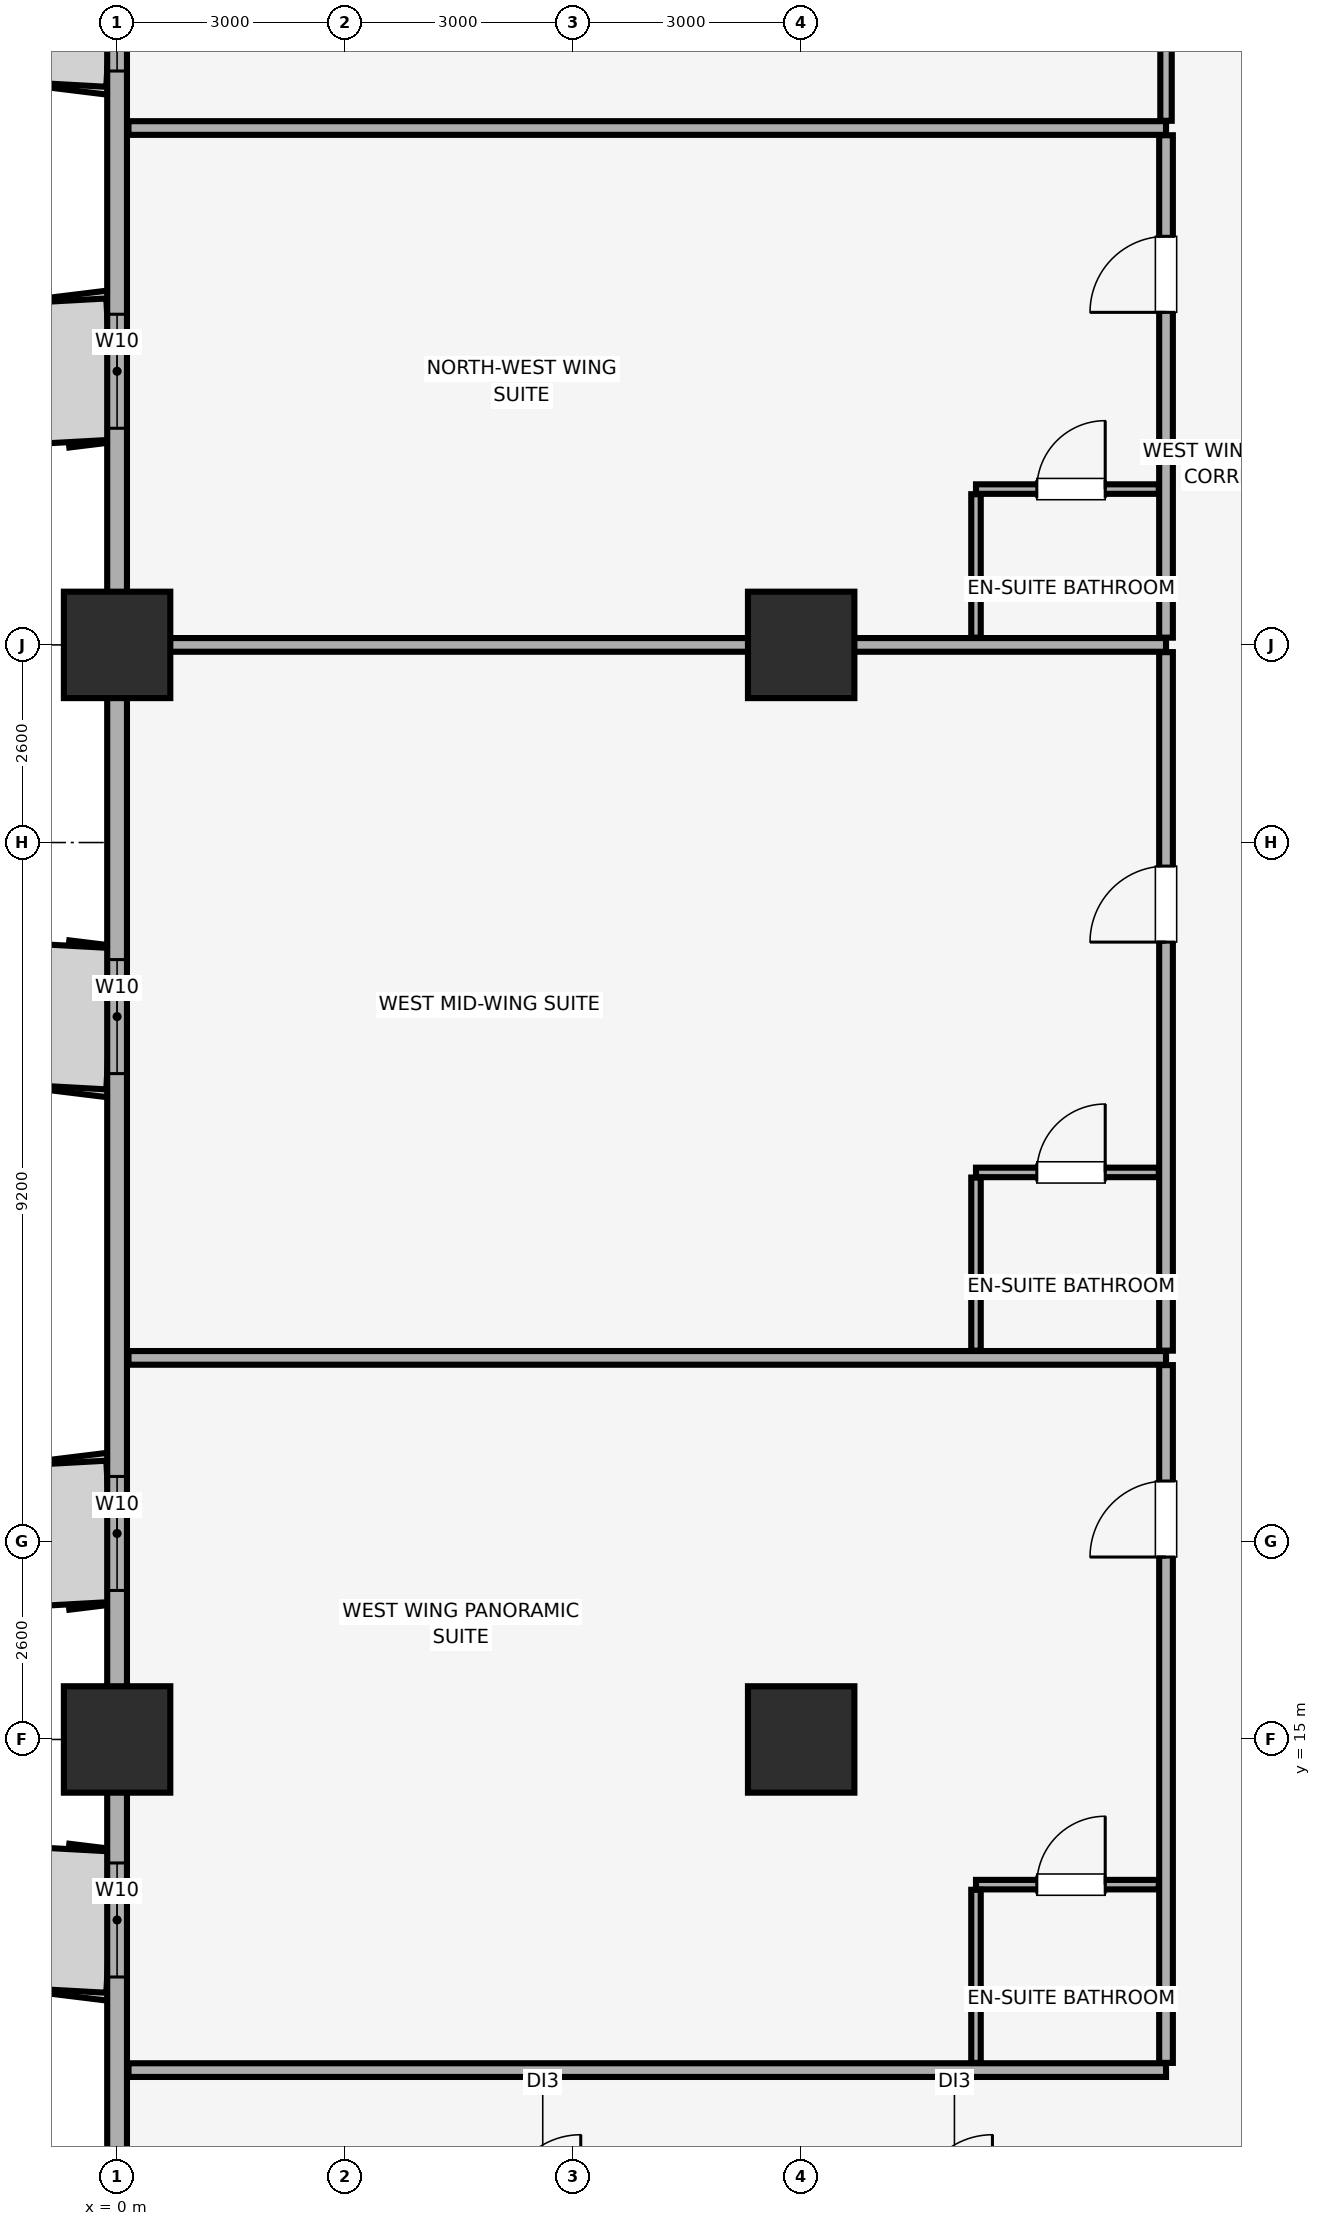
"""IFC4 building model, lengths in metres.
Left out: names, types, materials, properties, quantities, classifications, styles, units other than length and angle.
Written with IfcOpenShell. Run it as: python <this file> out.ifc"""

import sys

from ifc_helpers import new_model, si_unit, direction, frame, frame_2d, origin, origin_2d, place, context, subcontext, project, spatial, rectangle, extrude, element, fill, save


model = new_model("IFC4")
c1 = context("Model", 3, precision=1e-05, world=origin(), true_north=direction((0.0, 1.0)))
c2 = subcontext(c1, "Body", "Model", "MODEL_VIEW")
j1 = project(units=[si_unit("LENGTHUNIT", "METRE"), si_unit("PLANEANGLEUNIT", "RADIAN")], contexts=[c1])
p1 = place(None, origin())
s1 = spatial("IfcSite", under=j1, at=p1, CompositionType="ELEMENT")
p2 = place(p1, origin())
s2 = spatial("IfcBuilding", under=s1, at=p2, CompositionType="ELEMENT")
p3 = place(p2, frame((0.0, 0.0, 35.15)))
s3 = spatial("IfcBuildingStorey", under=s2, at=p3, CompositionType="ELEMENT", Elevation=35.15)
for number, where, z_axis, x_axis in (
    (1, (0.0, 15.0, 0.0), (0.0, 0.0, 1.0), (1.0, 0.0, 0.0)),
    (2, (0.0, 29.4, 0.0), (0.0, 0.0, 1.0), (1.0, 0.0, 0.0)),
    (3, (9.0, 15.0, 0.0), (0.0, 0.0, 1.0), (1.0, 0.0, 0.0)),
    (4, (9.0, 29.4, 0.0), (0.0, 0.0, 1.0), (1.0, 0.0, 0.0)),
):
    element("IfcColumn", number, at=place(p3, frame(where, z_axis=z_axis, x_axis=x_axis)), inside=s3, PredefinedType="COLUMN", context=c2, shape_type="SweptSolid", body=[
        extrude(rectangle(XDim=1.4, YDim=1.4, at=origin_2d()), origin(), (0.0, 0.0, 1.0), 3.51),
    ])
p4 = place(p3, frame((0.0, 44.8, 0.0), z_axis=(0.0, 0.0, 1.0), x_axis=(0.0, -1.0, 0.0)))
e5 = element("IfcWall", 5, at=p4, inside=s3, PredefinedType="SOLIDWALL", context=c2, shape_type="SweptSolid", body=[
    extrude(rectangle(XDim=40.6, YDim=0.26, at=frame_2d((20.3, 0.0))), origin(), (0.0, 0.0, 1.0), 2.56),
])
p5 = place(p4, frame((31.425, 0.0, 0.85)))
e6 = element("IfcOpeningElement", 6, at=p5, cuts=e5, PredefinedType="OPENING", context=c2, shape_type="SweptSolid", body=[
    extrude(rectangle(XDim=1.5, YDim=1.4, at=frame_2d((0.75, 0.7))), frame((0.0, 0.14, 0.0), z_axis=(0.0, -1.0, 0.0), x_axis=(1.0, 0.0, 0.0)), (0.0, 0.0, 1.0), 0.28),
])
p6 = place(p4, frame((26.34, 0.0, 0.85)))
e7 = element("IfcOpeningElement", 7, at=p6, cuts=e5, PredefinedType="OPENING", context=c2, shape_type="SweptSolid", body=[
    extrude(rectangle(XDim=1.5, YDim=1.4, at=frame_2d((0.75, 0.7))), frame((0.0, 0.14, 0.0), z_axis=(0.0, -1.0, 0.0), x_axis=(1.0, 0.0, 0.0)), (0.0, 0.0, 1.0), 0.28),
])
p7 = place(p4, frame((19.54, 0.0, 0.85)))
e8 = element("IfcOpeningElement", 8, at=p7, cuts=e5, PredefinedType="OPENING", context=c2, shape_type="SweptSolid", body=[
    extrude(rectangle(XDim=1.5, YDim=1.4, at=frame_2d((0.75, 0.7))), frame((0.0, 0.14, 0.0), z_axis=(0.0, -1.0, 0.0), x_axis=(1.0, 0.0, 0.0)), (0.0, 0.0, 1.0), 0.28),
])
p8 = place(p4, frame((11.05, 0.0, 0.85)))
e9 = element("IfcOpeningElement", 9, at=p8, cuts=e5, PredefinedType="OPENING", context=c2, shape_type="SweptSolid", body=[
    extrude(rectangle(XDim=1.5, YDim=1.4, at=frame_2d((0.75, 0.7))), frame((0.0, 0.14, 0.0), z_axis=(0.0, -1.0, 0.0), x_axis=(1.0, 0.0, 0.0)), (0.0, 0.0, 1.0), 0.28),
])
p9 = place(p4, frame((6.35, 0.0, 0.85)))
e10 = element("IfcOpeningElement", 10, at=p9, cuts=e5, PredefinedType="OPENING", context=c2, shape_type="SweptSolid", body=[
    extrude(rectangle(XDim=1.5, YDim=1.4, at=frame_2d((0.75, 0.7))), frame((0.0, 0.14, 0.0), z_axis=(0.0, -1.0, 0.0), x_axis=(1.0, 0.0, 0.0)), (0.0, 0.0, 1.0), 0.28),
])
p10 = place(p4, frame((1.735, 0.0, 0.85)))
e11 = element("IfcOpeningElement", 11, at=p10, cuts=e5, PredefinedType="OPENING", context=c2, shape_type="SweptSolid", body=[
    extrude(rectangle(XDim=1.5, YDim=1.4, at=frame_2d((0.75, 0.7))), frame((0.0, 0.14, 0.0), z_axis=(0.0, -1.0, 0.0), x_axis=(1.0, 0.0, 0.0)), (0.0, 0.0, 1.0), 0.28),
])
for number, where, z_axis, x_axis in (
    (12, (0.15, 10.65, 0.0), (0.0, 0.0, 1.0), (1.0, 0.0, 0.0)),
    (13, (0.15, 20.02, 0.0), (0.0, 0.0, 1.0), (1.0, 0.0, 0.0)),
):
    element("IfcWall", number, at=place(p3, frame(where, z_axis=z_axis, x_axis=x_axis)), inside=s3, PredefinedType="PARTITIONING", context=c2, shape_type="SweptSolid", body=[
        extrude(rectangle(XDim=13.65, YDim=0.18, at=frame_2d((6.825, 0.0))), origin(), (0.0, 0.0, 1.0), 3.51),
    ])
p11 = place(p3, frame((13.8, 10.745, 0.0), z_axis=(0.0, 0.0, 1.0), x_axis=(0.0, 1.0, 0.0)))
e14 = element("IfcWall", 14, at=p11, inside=s3, PredefinedType="PARTITIONING", context=c2, shape_type="SweptSolid", body=[
    extrude(rectangle(XDim=9.18, YDim=0.18, at=frame_2d((4.59, 0.0))), origin(), (0.0, 0.0, 1.0), 3.51),
])
p12 = place(p11, frame((6.655, 0.0, 0.0)))
e15 = element("IfcOpeningElement", 15, at=p12, cuts=e14, PredefinedType="OPENING", context=c2, shape_type="SweptSolid", body=[
    extrude(rectangle(XDim=1.0, YDim=2.15, at=frame_2d((0.5, 1.075))), frame((0.0, 0.1, 0.0), z_axis=(0.0, -1.0, 0.0), x_axis=(1.0, 0.0, 0.0)), (0.0, 0.0, 1.0), 0.2),
])
p13 = place(p3, frame((11.3, 13.09, 0.0), z_axis=(0.0, 0.0, 1.0), x_axis=(1.0, 0.0, 0.0)))
e16 = element("IfcWall", 16, at=p13, inside=s3, PredefinedType="PARTITIONING", context=c2, shape_type="SweptSolid", body=[
    extrude(rectangle(XDim=2.405, YDim=0.125, at=frame_2d((1.203, 0.0))), origin(), (0.0, 0.0, 1.0), 3.51),
])
p14 = place(p13, frame((0.8, 0.0, 0.0)))
e17 = element("IfcOpeningElement", 17, at=p14, cuts=e16, PredefinedType="OPENING", context=c2, shape_type="SweptSolid", body=[
    extrude(rectangle(XDim=0.9, YDim=2.1, at=frame_2d((0.45, 1.05))), frame((0.0, 0.073, 0.0), z_axis=(0.0, -1.0, 0.0), x_axis=(1.0, 0.0, 0.0)), (0.0, 0.0, 1.0), 0.145),
])
p15 = place(p3, frame((11.3, 10.745, 0.0), z_axis=(0.0, 0.0, 1.0), x_axis=(0.0, 1.0, 0.0)))
e18 = element("IfcWall", 18, at=p15, inside=s3, PredefinedType="PARTITIONING", context=c2, shape_type="SweptSolid", body=[
    extrude(rectangle(XDim=2.277, YDim=0.125, at=frame_2d((1.139, 0.0))), origin(), (0.0, 0.0, 1.0), 3.51),
])
p16 = place(p3, frame((0.15, 29.4, 0.0), z_axis=(0.0, 0.0, 1.0), x_axis=(1.0, 0.0, 0.0)))
e19 = element("IfcWall", 19, at=p16, inside=s3, PredefinedType="PARTITIONING", context=c2, shape_type="SweptSolid", body=[
    extrude(rectangle(XDim=13.65, YDim=0.18, at=frame_2d((6.825, 0.0))), origin(), (0.0, 0.0, 1.0), 2.86),
])
p17 = place(p3, frame((13.8, 20.115, 0.0), z_axis=(0.0, 0.0, 1.0), x_axis=(0.0, 1.0, 0.0)))
e20 = element("IfcWall", 20, at=p17, inside=s3, PredefinedType="PARTITIONING", context=c2, shape_type="SweptSolid", body=[
    extrude(rectangle(XDim=9.19, YDim=0.18, at=frame_2d((4.595, 0.0))), origin(), (0.0, 0.0, 1.0), 3.51),
])
p18 = place(p17, frame((5.375, 0.0, 0.0)))
e21 = element("IfcOpeningElement", 21, at=p18, cuts=e20, PredefinedType="OPENING", context=c2, shape_type="SweptSolid", body=[
    extrude(rectangle(XDim=1.0, YDim=2.15, at=frame_2d((0.5, 1.075))), frame((0.0, 0.1, 0.0), z_axis=(0.0, -1.0, 0.0), x_axis=(1.0, 0.0, 0.0)), (0.0, 0.0, 1.0), 0.2),
])
p19 = place(p3, frame((11.3, 22.46, 0.0), z_axis=(0.0, 0.0, 1.0), x_axis=(1.0, 0.0, 0.0)))
e22 = element("IfcWall", 22, at=p19, inside=s3, PredefinedType="PARTITIONING", context=c2, shape_type="SweptSolid", body=[
    extrude(rectangle(XDim=2.405, YDim=0.125, at=frame_2d((1.203, 0.0))), origin(), (0.0, 0.0, 1.0), 3.51),
])
p20 = place(p19, frame((0.8, 0.0, 0.0)))
e23 = element("IfcOpeningElement", 23, at=p20, cuts=e22, PredefinedType="OPENING", context=c2, shape_type="SweptSolid", body=[
    extrude(rectangle(XDim=0.9, YDim=2.1, at=frame_2d((0.45, 1.05))), frame((0.0, 0.073, 0.0), z_axis=(0.0, -1.0, 0.0), x_axis=(1.0, 0.0, 0.0)), (0.0, 0.0, 1.0), 0.145),
])
p21 = place(p3, frame((11.3, 20.115, 0.0), z_axis=(0.0, 0.0, 1.0), x_axis=(0.0, 1.0, 0.0)))
e24 = element("IfcWall", 24, at=p21, inside=s3, PredefinedType="PARTITIONING", context=c2, shape_type="SweptSolid", body=[
    extrude(rectangle(XDim=2.278, YDim=0.125, at=frame_2d((1.139, 0.0))), origin(), (0.0, 0.0, 1.0), 3.51),
])
p22 = place(p3, frame((0.15, 36.2, 0.0), z_axis=(0.0, 0.0, 1.0), x_axis=(1.0, 0.0, 0.0)))
e25 = element("IfcWall", 25, at=p22, inside=s3, PredefinedType="PARTITIONING", context=c2, shape_type="SweptSolid", body=[
    extrude(rectangle(XDim=13.65, YDim=0.18, at=frame_2d((6.825, 0.0))), origin(), (0.0, 0.0, 1.0), 3.51),
])
p23 = place(p3, frame((13.8, 29.495, 0.0), z_axis=(0.0, 0.0, 1.0), x_axis=(0.0, 1.0, 0.0)))
e26 = element("IfcWall", 26, at=p23, inside=s3, PredefinedType="PARTITIONING", context=c2, shape_type="SweptSolid", body=[
    extrude(rectangle(XDim=6.61, YDim=0.18, at=frame_2d((3.305, 0.0))), origin(), (0.0, 0.0, 1.0), 3.51),
])
p24 = place(p23, frame((4.28, 0.0, 0.0)))
e27 = element("IfcOpeningElement", 27, at=p24, cuts=e26, PredefinedType="OPENING", context=c2, shape_type="SweptSolid", body=[
    extrude(rectangle(XDim=1.0, YDim=2.15, at=frame_2d((0.5, 1.075))), frame((0.0, 0.1, 0.0), z_axis=(0.0, -1.0, 0.0), x_axis=(1.0, 0.0, 0.0)), (0.0, 0.0, 1.0), 0.2),
])
p25 = place(p3, frame((11.3, 31.45, 0.0), z_axis=(0.0, 0.0, 1.0), x_axis=(1.0, 0.0, 0.0)))
e28 = element("IfcWall", 28, at=p25, inside=s3, PredefinedType="PARTITIONING", context=c2, shape_type="SweptSolid", body=[
    extrude(rectangle(XDim=2.405, YDim=0.125, at=frame_2d((1.203, 0.0))), origin(), (0.0, 0.0, 1.0), 3.51),
])
p26 = place(p25, frame((0.8, 0.0, 0.0)))
e29 = element("IfcOpeningElement", 29, at=p26, cuts=e28, PredefinedType="OPENING", context=c2, shape_type="SweptSolid", body=[
    extrude(rectangle(XDim=0.9, YDim=2.1, at=frame_2d((0.45, 1.05))), frame((0.0, 0.073, 0.0), z_axis=(0.0, -1.0, 0.0), x_axis=(1.0, 0.0, 0.0)), (0.0, 0.0, 1.0), 0.145),
])
p27 = place(p3, frame((11.3, 29.495, 0.0), z_axis=(0.0, 0.0, 1.0), x_axis=(0.0, 1.0, 0.0)))
e30 = element("IfcWall", 30, at=p27, inside=s3, PredefinedType="PARTITIONING", context=c2, shape_type="SweptSolid", body=[
    extrude(rectangle(XDim=1.887, YDim=0.125, at=frame_2d((0.944, 0.0))), origin(), (0.0, 0.0, 1.0), 3.51),
])
p28 = place(p3, frame((13.8, 36.295, 0.0), z_axis=(0.0, 0.0, 1.0), x_axis=(0.0, 1.0, 0.0)))
e31 = element("IfcWall", 31, at=p28, inside=s3, PredefinedType="PARTITIONING", context=c2, shape_type="SweptSolid", body=[
    extrude(rectangle(XDim=12.555, YDim=0.15, at=frame_2d((6.278, 0.0))), origin(), (0.0, 0.0, 1.0), 3.51),
])
p29 = place(p28, frame((4.155, 0.0, 0.0)))
e32 = element("IfcOpeningElement", 32, at=p29, cuts=e31, PredefinedType="OPENING", context=c2, shape_type="SweptSolid", body=[
    extrude(rectangle(XDim=1.0, YDim=2.15, at=frame_2d((0.5, 1.075))), frame((0.0, 0.085, 0.0), z_axis=(0.0, -1.0, 0.0), x_axis=(1.0, 0.0, 0.0)), (0.0, 0.0, 1.0), 0.17),
])
p30 = place(p5, origin())
e33 = element("IfcWindow", 33, at=p30, inside=s3, PartitioningType="SINGLE_PANEL", PredefinedType="WINDOW", context=c2, shape_type="SweptSolid", body=[
    extrude(rectangle(XDim=1.5, YDim=1.4, at=frame_2d((0.75, 0.7))), frame((0.0, 0.03, 0.0), z_axis=(0.0, -1.0, 0.0), x_axis=(1.0, 0.0, 0.0)), (0.0, 0.0, 1.0), 0.06),
])
fill(e6, e33)
p31 = place(p6, origin())
e34 = element("IfcWindow", 34, at=p31, inside=s3, PartitioningType="SINGLE_PANEL", PredefinedType="WINDOW", context=c2, shape_type="SweptSolid", body=[
    extrude(rectangle(XDim=1.5, YDim=1.4, at=frame_2d((0.75, 0.7))), frame((0.0, 0.03, 0.0), z_axis=(0.0, -1.0, 0.0), x_axis=(1.0, 0.0, 0.0)), (0.0, 0.0, 1.0), 0.06),
])
fill(e7, e34)
p32 = place(p7, origin())
e35 = element("IfcWindow", 35, at=p32, inside=s3, PartitioningType="SINGLE_PANEL", PredefinedType="WINDOW", context=c2, shape_type="SweptSolid", body=[
    extrude(rectangle(XDim=1.5, YDim=1.4, at=frame_2d((0.75, 0.7))), frame((0.0, 0.03, 0.0), z_axis=(0.0, -1.0, 0.0), x_axis=(1.0, 0.0, 0.0)), (0.0, 0.0, 1.0), 0.06),
])
fill(e8, e35)
p33 = place(p8, origin())
e36 = element("IfcWindow", 36, at=p33, inside=s3, PartitioningType="SINGLE_PANEL", PredefinedType="WINDOW", context=c2, shape_type="SweptSolid", body=[
    extrude(rectangle(XDim=1.5, YDim=1.4, at=frame_2d((0.75, 0.7))), frame((0.0, 0.03, 0.0), z_axis=(0.0, -1.0, 0.0), x_axis=(1.0, 0.0, 0.0)), (0.0, 0.0, 1.0), 0.06),
])
fill(e9, e36)
p34 = place(p9, origin())
e37 = element("IfcWindow", 37, at=p34, inside=s3, PartitioningType="SINGLE_PANEL", PredefinedType="WINDOW", context=c2, shape_type="SweptSolid", body=[
    extrude(rectangle(XDim=1.5, YDim=1.4, at=frame_2d((0.75, 0.7))), frame((0.0, 0.03, 0.0), z_axis=(0.0, -1.0, 0.0), x_axis=(1.0, 0.0, 0.0)), (0.0, 0.0, 1.0), 0.06),
])
fill(e10, e37)
p35 = place(p12, origin())
e38 = element("IfcDoor", 38, at=p35, inside=s3, OperationType="SINGLE_SWING_LEFT", PredefinedType="DOOR", context=c2, shape_type="SweptSolid", body=[
    extrude(rectangle(XDim=1.0, YDim=2.15, at=frame_2d((0.5, 1.075))), frame((0.0, 0.025, 0.0), z_axis=(0.0, -1.0, 0.0), x_axis=(1.0, 0.0, 0.0)), (0.0, 0.0, 1.0), 0.05),
])
fill(e15, e38)
p36 = place(p14, origin())
e39 = element("IfcDoor", 39, at=p36, inside=s3, OperationType="SINGLE_SWING_RIGHT", PredefinedType="DOOR", context=c2, shape_type="SweptSolid", body=[
    extrude(rectangle(XDim=0.9, YDim=2.1, at=frame_2d((0.45, 1.05))), frame((0.0, 0.025, 0.0), z_axis=(0.0, -1.0, 0.0), x_axis=(1.0, 0.0, 0.0)), (0.0, 0.0, 1.0), 0.05),
])
fill(e17, e39)
p37 = place(p18, origin())
e40 = element("IfcDoor", 40, at=p37, inside=s3, OperationType="SINGLE_SWING_LEFT", PredefinedType="DOOR", context=c2, shape_type="SweptSolid", body=[
    extrude(rectangle(XDim=1.0, YDim=2.15, at=frame_2d((0.5, 1.075))), frame((0.0, 0.025, 0.0), z_axis=(0.0, -1.0, 0.0), x_axis=(1.0, 0.0, 0.0)), (0.0, 0.0, 1.0), 0.05),
])
fill(e21, e40)
p38 = place(p20, origin())
e41 = element("IfcDoor", 41, at=p38, inside=s3, OperationType="SINGLE_SWING_RIGHT", PredefinedType="DOOR", context=c2, shape_type="SweptSolid", body=[
    extrude(rectangle(XDim=0.9, YDim=2.1, at=frame_2d((0.45, 1.05))), frame((0.0, 0.025, 0.0), z_axis=(0.0, -1.0, 0.0), x_axis=(1.0, 0.0, 0.0)), (0.0, 0.0, 1.0), 0.05),
])
fill(e23, e41)
p39 = place(p24, origin())
e42 = element("IfcDoor", 42, at=p39, inside=s3, OperationType="SINGLE_SWING_LEFT", PredefinedType="DOOR", context=c2, shape_type="SweptSolid", body=[
    extrude(rectangle(XDim=1.0, YDim=2.15, at=frame_2d((0.5, 1.075))), frame((0.0, 0.025, 0.0), z_axis=(0.0, -1.0, 0.0), x_axis=(1.0, 0.0, 0.0)), (0.0, 0.0, 1.0), 0.05),
])
fill(e27, e42)
p40 = place(p26, origin())
e43 = element("IfcDoor", 43, at=p40, inside=s3, OperationType="SINGLE_SWING_RIGHT", PredefinedType="DOOR", context=c2, shape_type="SweptSolid", body=[
    extrude(rectangle(XDim=0.9, YDim=2.1, at=frame_2d((0.45, 1.05))), frame((0.0, 0.025, 0.0), z_axis=(0.0, -1.0, 0.0), x_axis=(1.0, 0.0, 0.0)), (0.0, 0.0, 1.0), 0.05),
])
fill(e29, e43)
save(model, sys.argv[1])
